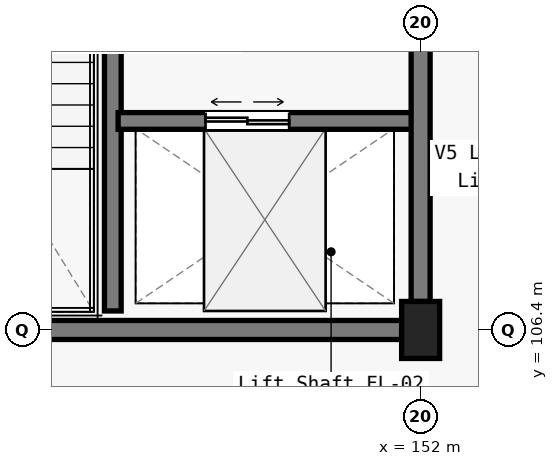
"""IFC4 building model, lengths in metres.
Left out: names, types, materials, properties, quantities, classifications, styles, units other than length and angle.
Written with IfcOpenShell. Run it as: python <this file> out.ifc"""

import sys

from ifc_helpers import new_model, si_unit, direction, frame, frame_2d, origin, origin_2d, place, context, subcontext, project, spatial, rectangle, extrude, element, fill, save


model = new_model("IFC4")
c1 = context("Model", 3, precision=1e-05, world=origin(), true_north=direction((0.0, 1.0)))
c2 = subcontext(c1, "Body", "Model", "MODEL_VIEW")
j1 = project(units=[si_unit("LENGTHUNIT", "METRE"), si_unit("PLANEANGLEUNIT", "RADIAN")], contexts=[c1])
p1 = place(None, origin())
s1 = spatial("IfcSite", under=j1, at=p1, CompositionType="ELEMENT")
p2 = place(p1, origin())
s2 = spatial("IfcBuilding", under=s1, at=p2, CompositionType="ELEMENT")
p3 = place(p2, frame((0.0, 0.0, 19.8)))
s3 = spatial("IfcBuildingStorey", under=s2, at=p3, CompositionType="ELEMENT", Elevation=19.8)
p4 = place(p3, frame((152.0, 106.4, 0.0), z_axis=(0.0, 0.0, 1.0), x_axis=(1.0, 0.0, 0.0)))
e1 = element("IfcColumn", 1, at=p4, inside=s3, PredefinedType="COLUMN", context=c2, shape_type="SweptSolid", body=[
    extrude(rectangle(XDim=0.5, YDim=0.75, at=origin_2d()), origin(), (0.0, 0.0, 1.0), 4.8),
])
p5 = place(p3, frame((144.3, 106.4, 0.0), z_axis=(0.0, 0.0, 1.0), x_axis=(1.0, 0.0, 0.0)))
e2 = element("IfcWall", 2, at=p5, inside=s3, PredefinedType="SOLIDWALL", context=c2, shape_type="SweptSolid", body=[
    extrude(rectangle(XDim=7.45, YDim=0.25, at=frame_2d((3.725, 0.0))), origin(), (0.0, 0.0, 1.0), 3.715),
])
p6 = place(p3, frame((147.95, 106.65, 0.0), z_axis=(0.0, 0.0, 1.0), x_axis=(0.0, 1.0, 0.0)))
e3 = element("IfcWall", 3, at=p6, inside=s3, PredefinedType="SOLIDWALL", context=c2, shape_type="SweptSolid", body=[
    extrude(rectangle(XDim=7.1, YDim=0.22, at=frame_2d((3.55, 0.0))), origin(), (0.0, 0.0, 1.0), 4.54),
])
p7 = place(p6, frame((5.55, 0.0, 0.0)))
e4 = element("IfcOpeningElement", 4, at=p7, cuts=e3, PredefinedType="OPENING", context=c2, shape_type="SweptSolid", body=[
    extrude(rectangle(XDim=1.2, YDim=2.15, at=frame_2d((0.6, 1.075))), frame((0.0, 0.12, 0.0), z_axis=(0.0, -1.0, 0.0), x_axis=(1.0, 0.0, 0.0)), (0.0, 0.0, 1.0), 0.24),
])
p8 = place(p3, frame((148.02, 109.15, 0.0), z_axis=(0.0, 0.0, 1.0), x_axis=(1.0, 0.0, 0.0)))
e5 = element("IfcWall", 5, at=p8, inside=s3, PredefinedType="SOLIDWALL", context=c2, shape_type="SweptSolid", body=[
    extrude(rectangle(XDim=3.93, YDim=0.22, at=frame_2d((1.965, 0.0))), origin(), (0.0, 0.0, 1.0), 3.89),
])
p9 = place(p8, frame((1.15, 0.0, 0.0)))
e6 = element("IfcOpeningElement", 6, at=p9, cuts=e5, PredefinedType="OPENING", context=c2, shape_type="SweptSolid", body=[
    extrude(rectangle(XDim=1.1, YDim=2.2, at=frame_2d((0.55, 1.1))), frame((0.0, 0.12, 0.0), z_axis=(0.0, -1.0, 0.0), x_axis=(1.0, 0.0, 0.0)), (0.0, 0.0, 1.0), 0.24),
])
p10 = place(p3, frame((152.0, 106.775, 0.0), z_axis=(0.0, 0.0, 1.0), x_axis=(0.0, 1.0, 0.0)))
e7 = element("IfcWall", 7, at=p10, inside=s3, PredefinedType="SOLIDWALL", context=c2, shape_type="SweptSolid", body=[
    extrude(rectangle(XDim=6.925, YDim=0.25, at=frame_2d((3.462, 0.0))), origin(), (0.0, 0.0, 1.0), 3.765),
])
p11 = place(p10, frame((3.475, 0.0, 0.0)))
e8 = element("IfcOpeningElement", 8, at=p11, cuts=e7, PredefinedType="OPENING", context=c2, shape_type="SweptSolid", body=[
    extrude(rectangle(XDim=1.35, YDim=2.2, at=frame_2d((0.675, 1.1))), frame((0.0, 0.135, 0.0), z_axis=(0.0, -1.0, 0.0), x_axis=(1.0, 0.0, 0.0)), (0.0, 0.0, 1.0), 0.27),
])
p12 = place(p9, origin())
e9 = element("IfcDoor", 9, at=p12, inside=s3, OperationType="DOUBLE_DOOR_SLIDING", PredefinedType="DOOR", context=c2, shape_type="SweptSolid", body=[
    extrude(rectangle(XDim=1.1, YDim=2.2, at=frame_2d((0.55, 1.1))), frame((0.0, 0.025, 0.0), z_axis=(0.0, -1.0, 0.0), x_axis=(1.0, 0.0, 0.0)), (0.0, 0.0, 1.0), 0.05),
])
fill(e6, e9)
save(model, sys.argv[1])
